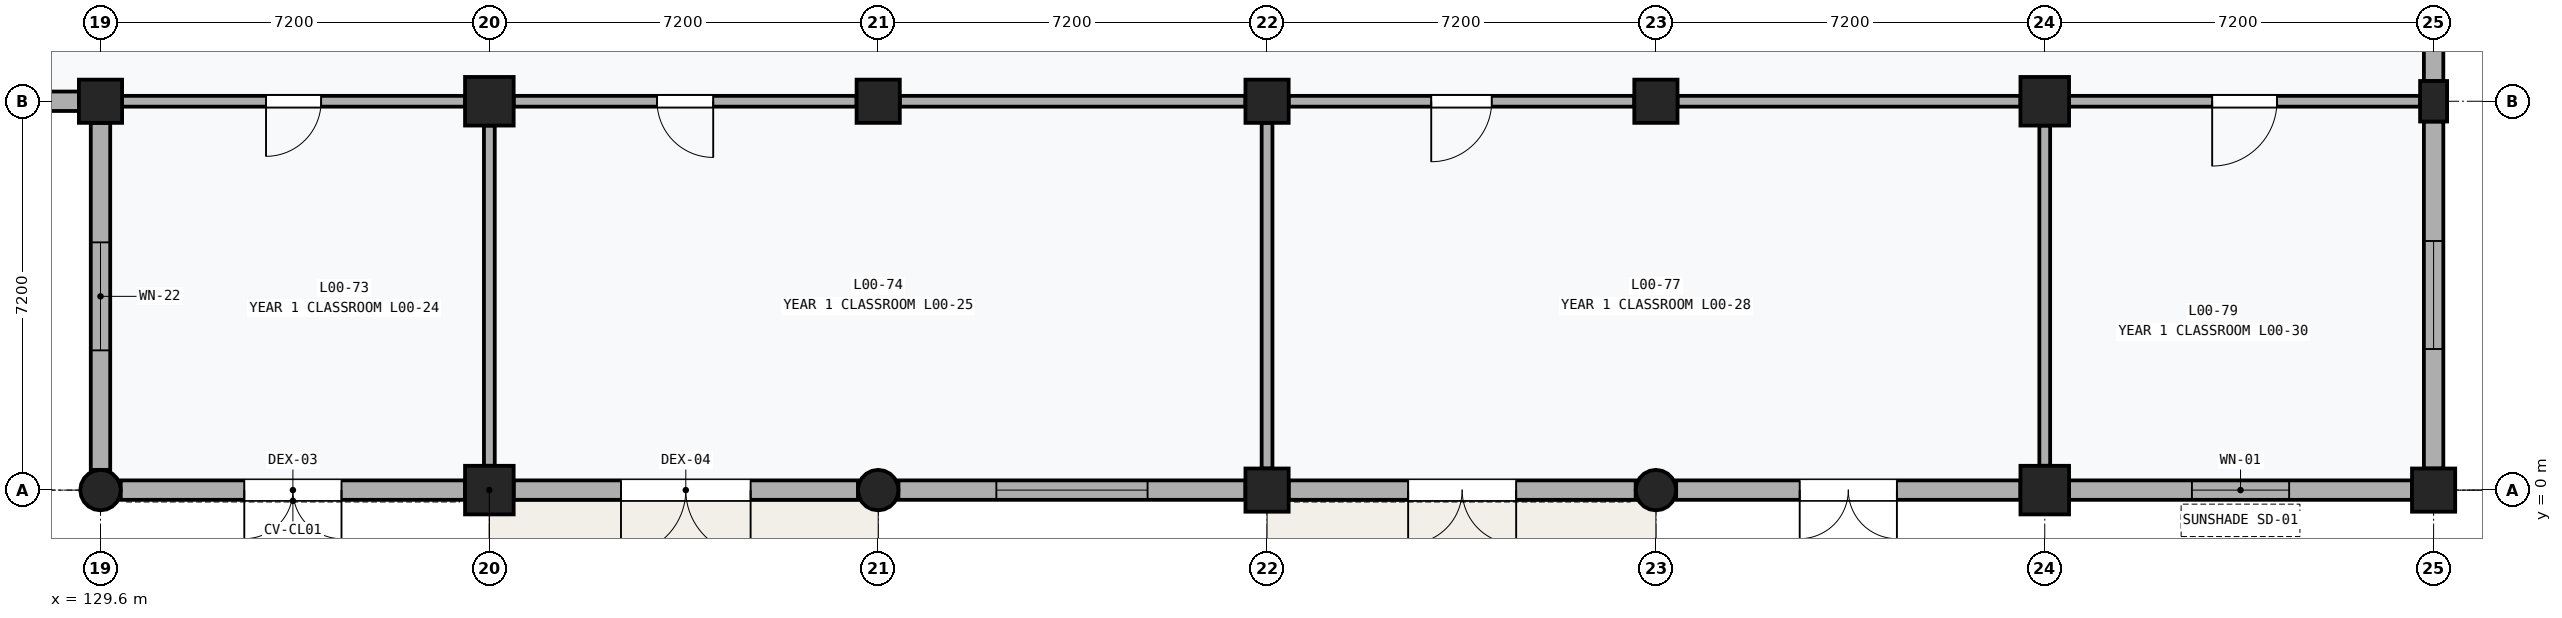
"""IFC4 building model, lengths in metres.
Left out: names, types, materials, properties, quantities, classifications, styles, units other than length and angle.
Written with IfcOpenShell. Run it as: python <this file> out.ifc"""

import sys

from ifc_helpers import new_model, si_unit, direction, frame, frame_2d, origin, origin_2d, place, context, subcontext, project, spatial, rectangle, circle, extrude, element, fill, save


model = new_model("IFC4")
c1 = context("Model", 3, precision=1e-05, world=origin(), true_north=direction((0.0, 1.0)))
c2 = subcontext(c1, "Body", "Model", "MODEL_VIEW")
j1 = project(units=[si_unit("LENGTHUNIT", "METRE"), si_unit("PLANEANGLEUNIT", "RADIAN")], contexts=[c1])
p1 = place(None, origin())
s1 = spatial("IfcSite", under=j1, at=p1, CompositionType="ELEMENT")
p2 = place(p1, origin())
s2 = spatial("IfcBuilding", under=s1, at=p2, CompositionType="ELEMENT")
p3 = place(p2, origin())
s3 = spatial("IfcBuildingStorey", under=s2, at=p3, CompositionType="ELEMENT", Elevation=0.0)
p4 = place(p3, frame((129.6, 0.0, 0.0), z_axis=(0.0, 0.0, 1.0), x_axis=(1.0, 0.0, 0.0)))
e1 = element("IfcColumn", 1, at=p4, inside=s3, PredefinedType="COLUMN", context=c2, shape_type="SweptSolid", body=[
    extrude(circle(Radius=0.375, at=origin_2d()), origin(), (0.0, 0.0, 1.0), 4.8),
])
p5 = place(p3, frame((129.6, 7.2, 0.0), z_axis=(0.0, 0.0, 1.0), x_axis=(1.0, 0.0, 0.0)))
e2 = element("IfcColumn", 2, at=p5, inside=s3, PredefinedType="COLUMN", context=c2, shape_type="SweptSolid", body=[
    extrude(rectangle(XDim=0.8, YDim=0.8, at=origin_2d()), origin(), (0.0, 0.0, 1.0), 4.8),
])
for number, where, z_axis, x_axis in (
    (3, (136.8, 0.0, 0.0), (0.0, 0.0, 1.0), (1.0, 0.0, 0.0)),
    (4, (136.8, 7.2, 0.0), (0.0, 0.0, 1.0), (1.0, 0.0, 0.0)),
):
    element("IfcColumn", number, at=place(p3, frame(where, z_axis=z_axis, x_axis=x_axis)), inside=s3, PredefinedType="COLUMN", context=c2, shape_type="SweptSolid", body=[
        extrude(rectangle(XDim=0.9, YDim=0.9, at=origin_2d()), origin(), (0.0, 0.0, 1.0), 4.8),
    ])
p6 = place(p3, frame((144.0, 0.0, 0.0), z_axis=(0.0, 0.0, 1.0), x_axis=(1.0, 0.0, 0.0)))
e5 = element("IfcColumn", 5, at=p6, inside=s3, PredefinedType="COLUMN", context=c2, shape_type="SweptSolid", body=[
    extrude(circle(Radius=0.375, at=origin_2d()), origin(), (0.0, 0.0, 1.0), 4.8),
])
for number, where, z_axis, x_axis in (
    (6, (144.0, 7.2, 0.0), (0.0, 0.0, 1.0), (1.0, 0.0, 0.0)),
    (7, (151.2, 0.0, 0.0), (0.0, 0.0, 1.0), (1.0, 0.0, 0.0)),
    (8, (151.2, 7.2, 0.0), (0.0, 0.0, 1.0), (1.0, 0.0, 0.0)),
):
    element("IfcColumn", number, at=place(p3, frame(where, z_axis=z_axis, x_axis=x_axis)), inside=s3, PredefinedType="COLUMN", context=c2, shape_type="SweptSolid", body=[
        extrude(rectangle(XDim=0.8, YDim=0.8, at=origin_2d()), origin(), (0.0, 0.0, 1.0), 4.8),
    ])
p7 = place(p3, frame((158.4, 0.0, 0.0), z_axis=(0.0, 0.0, 1.0), x_axis=(1.0, 0.0, 0.0)))
e9 = element("IfcColumn", 9, at=p7, inside=s3, PredefinedType="COLUMN", context=c2, shape_type="SweptSolid", body=[
    extrude(circle(Radius=0.375, at=origin_2d()), origin(), (0.0, 0.0, 1.0), 4.8),
])
p8 = place(p3, frame((158.4, 7.2, 0.0), z_axis=(0.0, 0.0, 1.0), x_axis=(1.0, 0.0, 0.0)))
e10 = element("IfcColumn", 10, at=p8, inside=s3, PredefinedType="COLUMN", context=c2, shape_type="SweptSolid", body=[
    extrude(rectangle(XDim=0.8, YDim=0.8, at=origin_2d()), origin(), (0.0, 0.0, 1.0), 4.8),
])
for number, where, z_axis, x_axis in (
    (11, (165.6, 0.0, 0.0), (0.0, 0.0, 1.0), (1.0, 0.0, 0.0)),
    (12, (165.6, 7.2, 0.0), (0.0, 0.0, 1.0), (1.0, 0.0, 0.0)),
):
    element("IfcColumn", number, at=place(p3, frame(where, z_axis=z_axis, x_axis=x_axis)), inside=s3, PredefinedType="COLUMN", context=c2, shape_type="SweptSolid", body=[
        extrude(rectangle(XDim=0.9, YDim=0.9, at=origin_2d()), origin(), (0.0, 0.0, 1.0), 4.8),
    ])
p9 = place(p3, frame((172.8, 0.0, 0.0), z_axis=(0.0, 0.0, 1.0), x_axis=(1.0, 0.0, 0.0)))
e13 = element("IfcColumn", 13, at=p9, inside=s3, PredefinedType="COLUMN", context=c2, shape_type="SweptSolid", body=[
    extrude(rectangle(XDim=0.8, YDim=0.8, at=origin_2d()), origin(), (0.0, 0.0, 1.0), 4.8),
])
p10 = place(p3, frame((172.8, 7.2, 0.0), z_axis=(0.0, 0.0, 1.0), x_axis=(1.0, 0.0, 0.0)))
e14 = element("IfcColumn", 14, at=p10, inside=s3, PredefinedType="PILASTER", context=c2, shape_type="SweptSolid", body=[
    extrude(rectangle(XDim=0.5, YDim=0.75, at=origin_2d()), origin(), (0.0, 0.0, 1.0), 4.8),
])
p11 = place(p3, frame((122.8, 7.2, 0.0), z_axis=(0.0, 0.0, 1.0), x_axis=(1.0, 0.0, 0.0)))
e15 = element("IfcWall", 15, at=p11, inside=s3, PredefinedType="SOLIDWALL", context=c2, shape_type="SweptSolid", body=[
    extrude(rectangle(XDim=6.4, YDim=0.36, at=frame_2d((3.2, 0.0))), origin(), (0.0, 0.0, 1.0), 3.89),
])
p12 = place(p11, frame((2.2, 0.0, 0.0)))
e16 = element("IfcOpeningElement", 16, at=p12, cuts=e15, PredefinedType="OPENING", context=c2, shape_type="SweptSolid", body=[
    extrude(rectangle(XDim=2.0, YDim=2.4, at=frame_2d((1.0, 1.2))), frame((0.0, 0.192, 0.0), z_axis=(0.0, -1.0, 0.0), x_axis=(1.0, 0.0, 0.0)), (0.0, 0.0, 1.0), 0.384),
])
p13 = place(p3, frame((129.975, 0.0, 0.0), z_axis=(0.0, 0.0, 1.0), x_axis=(1.0, 0.0, 0.0)))
e17 = element("IfcWall", 17, at=p13, inside=s3, PredefinedType="SOLIDWALL", context=c2, shape_type="SweptSolid", body=[
    extrude(rectangle(XDim=6.375, YDim=0.36, at=frame_2d((3.188, 0.0))), origin(), (0.0, 0.0, 1.0), 3.89),
])
p14 = place(p13, frame((2.288, 0.0, 0.0)))
e18 = element("IfcOpeningElement", 18, at=p14, cuts=e17, PredefinedType="OPENING", context=c2, shape_type="SweptSolid", body=[
    extrude(rectangle(XDim=1.8, YDim=2.35, at=frame_2d((0.9, 1.175))), frame((0.0, 0.192, 0.0), z_axis=(0.0, -1.0, 0.0), x_axis=(1.0, 0.0, 0.0)), (0.0, 0.0, 1.0), 0.384),
])
p15 = place(p3, frame((129.6, 0.375, 0.0), z_axis=(0.0, 0.0, 1.0), x_axis=(0.0, 1.0, 0.0)))
e19 = element("IfcWall", 19, at=p15, inside=s3, PredefinedType="SOLIDWALL", context=c2, shape_type="SweptSolid", body=[
    extrude(rectangle(XDim=6.425, YDim=0.36, at=frame_2d((3.212, 0.0))), origin(), (0.0, 0.0, 1.0), 3.89),
])
p16 = place(p15, frame((2.212, 0.0, 0.7)))
e20 = element("IfcOpeningElement", 20, at=p16, cuts=e19, PredefinedType="OPENING", context=c2, shape_type="SweptSolid", body=[
    extrude(rectangle(XDim=2.0, YDim=2.2, at=frame_2d((1.0, 1.1))), frame((0.0, 0.192, 0.0), z_axis=(0.0, -1.0, 0.0), x_axis=(1.0, 0.0, 0.0)), (0.0, 0.0, 1.0), 0.384),
])
p17 = place(p3, frame((137.25, 0.0, 0.0), z_axis=(0.0, 0.0, 1.0), x_axis=(1.0, 0.0, 0.0)))
e21 = element("IfcWall", 21, at=p17, inside=s3, PredefinedType="SOLIDWALL", context=c2, shape_type="SweptSolid", body=[
    extrude(rectangle(XDim=6.375, YDim=0.36, at=frame_2d((3.188, 0.0))), origin(), (0.0, 0.0, 1.0), 3.89),
])
p18 = place(p17, frame((1.988, 0.0, 0.0)))
e22 = element("IfcOpeningElement", 22, at=p18, cuts=e21, PredefinedType="OPENING", context=c2, shape_type="SweptSolid", body=[
    extrude(rectangle(XDim=2.4, YDim=2.45, at=frame_2d((1.2, 1.225))), frame((0.0, 0.192, 0.0), z_axis=(0.0, -1.0, 0.0), x_axis=(1.0, 0.0, 0.0)), (0.0, 0.0, 1.0), 0.384),
])
p19 = place(p3, frame((144.375, 0.0, 0.0), z_axis=(0.0, 0.0, 1.0), x_axis=(1.0, 0.0, 0.0)))
e23 = element("IfcWall", 23, at=p19, inside=s3, PredefinedType="SOLIDWALL", context=c2, shape_type="SweptSolid", body=[
    extrude(rectangle(XDim=6.425, YDim=0.36, at=frame_2d((3.212, 0.0))), origin(), (0.0, 0.0, 1.0), 3.89),
])
p20 = place(p19, frame((1.812, 0.0, 0.7)))
e24 = element("IfcOpeningElement", 24, at=p20, cuts=e23, PredefinedType="OPENING", context=c2, shape_type="SweptSolid", body=[
    extrude(rectangle(XDim=2.8, YDim=2.2, at=frame_2d((1.4, 1.1))), frame((0.0, 0.192, 0.0), z_axis=(0.0, -1.0, 0.0), x_axis=(1.0, 0.0, 0.0)), (0.0, 0.0, 1.0), 0.384),
])
p21 = place(p3, frame((151.6, 0.0, 0.0), z_axis=(0.0, 0.0, 1.0), x_axis=(1.0, 0.0, 0.0)))
e25 = element("IfcWall", 25, at=p21, inside=s3, PredefinedType="SOLIDWALL", context=c2, shape_type="SweptSolid", body=[
    extrude(rectangle(XDim=6.425, YDim=0.36, at=frame_2d((3.212, 0.0))), origin(), (0.0, 0.0, 1.0), 3.89),
])
p22 = place(p21, frame((2.212, 0.0, 0.0)))
e26 = element("IfcOpeningElement", 26, at=p22, cuts=e25, PredefinedType="OPENING", context=c2, shape_type="SweptSolid", body=[
    extrude(rectangle(XDim=2.0, YDim=2.4, at=frame_2d((1.0, 1.2))), frame((0.0, 0.192, 0.0), z_axis=(0.0, -1.0, 0.0), x_axis=(1.0, 0.0, 0.0)), (0.0, 0.0, 1.0), 0.384),
])
p23 = place(p3, frame((158.775, 0.0, 0.0), z_axis=(0.0, 0.0, 1.0), x_axis=(1.0, 0.0, 0.0)))
e27 = element("IfcWall", 27, at=p23, inside=s3, PredefinedType="SOLIDWALL", context=c2, shape_type="SweptSolid", body=[
    extrude(rectangle(XDim=6.375, YDim=0.36, at=frame_2d((3.188, 0.0))), origin(), (0.0, 0.0, 1.0), 3.89),
])
p24 = place(p23, frame((2.288, 0.0, 0.0)))
e28 = element("IfcOpeningElement", 28, at=p24, cuts=e27, PredefinedType="OPENING", context=c2, shape_type="SweptSolid", body=[
    extrude(rectangle(XDim=1.8, YDim=2.35, at=frame_2d((0.9, 1.175))), frame((0.0, 0.192, 0.0), z_axis=(0.0, -1.0, 0.0), x_axis=(1.0, 0.0, 0.0)), (0.0, 0.0, 1.0), 0.384),
])
p25 = place(p3, frame((166.05, 0.0, 0.0), z_axis=(0.0, 0.0, 1.0), x_axis=(1.0, 0.0, 0.0)))
e29 = element("IfcWall", 29, at=p25, inside=s3, PredefinedType="SOLIDWALL", context=c2, shape_type="SweptSolid", body=[
    extrude(rectangle(XDim=6.35, YDim=0.36, at=frame_2d((3.175, 0.0))), origin(), (0.0, 0.0, 1.0), 3.89),
])
p26 = place(p25, frame((2.275, 0.0, 0.9)))
e30 = element("IfcOpeningElement", 30, at=p26, cuts=e29, PredefinedType="OPENING", context=c2, shape_type="SweptSolid", body=[
    extrude(rectangle(XDim=1.8, YDim=1.8, at=frame_2d((0.9, 0.9))), frame((0.0, 0.192, 0.0), z_axis=(0.0, -1.0, 0.0), x_axis=(1.0, 0.0, 0.0)), (0.0, 0.0, 1.0), 0.384),
])
p27 = place(p3, frame((172.8, 0.4, 0.0), z_axis=(0.0, 0.0, 1.0), x_axis=(0.0, 1.0, 0.0)))
e31 = element("IfcWall", 31, at=p27, inside=s3, PredefinedType="SOLIDWALL", context=c2, shape_type="SweptSolid", body=[
    extrude(rectangle(XDim=6.425, YDim=0.36, at=frame_2d((3.212, 0.0))), origin(), (0.0, 0.0, 1.0), 3.89),
])
p28 = place(p27, frame((2.212, 0.0, 0.9)))
e32 = element("IfcOpeningElement", 32, at=p28, cuts=e31, PredefinedType="OPENING", context=c2, shape_type="SweptSolid", body=[
    extrude(rectangle(XDim=2.0, YDim=1.8, at=frame_2d((1.0, 0.9))), frame((0.0, 0.192, 0.0), z_axis=(0.0, -1.0, 0.0), x_axis=(1.0, 0.0, 0.0)), (0.0, 0.0, 1.0), 0.384),
])
p29 = place(p3, frame((172.8, 7.575, 0.0), z_axis=(0.0, 0.0, 1.0), x_axis=(0.0, 1.0, 0.0)))
e33 = element("IfcWall", 33, at=p29, inside=s3, PredefinedType="SOLIDWALL", context=c2, shape_type="SweptSolid", body=[
    extrude(rectangle(XDim=6.425, YDim=0.36, at=frame_2d((3.212, 0.0))), origin(), (0.0, 0.0, 1.0), 3.89),
])
p30 = place(p29, frame((2.113, 0.0, 0.9)))
e34 = element("IfcOpeningElement", 34, at=p30, cuts=e33, PredefinedType="OPENING", context=c2, shape_type="SweptSolid", body=[
    extrude(rectangle(XDim=2.2, YDim=1.8, at=frame_2d((1.1, 0.9))), frame((0.0, 0.192, 0.0), z_axis=(0.0, -1.0, 0.0), x_axis=(1.0, 0.0, 0.0)), (0.0, 0.0, 1.0), 0.384),
])
p31 = place(p3, frame((130.0, 7.2, 0.0), z_axis=(0.0, 0.0, 1.0), x_axis=(1.0, 0.0, 0.0)))
e35 = element("IfcWall", 35, at=p31, inside=s3, PredefinedType="PARTITIONING", context=c2, shape_type="SweptSolid", body=[
    extrude(rectangle(XDim=6.35, YDim=0.2, at=frame_2d((3.175, 0.0))), origin(), (0.0, 0.0, 1.0), 3.62),
])
p32 = place(p31, frame((2.665, 0.0, 0.0)))
e36 = element("IfcOpeningElement", 36, at=p32, cuts=e35, PredefinedType="OPENING", context=c2, shape_type="SweptSolid", body=[
    extrude(rectangle(XDim=1.02, YDim=2.12, at=frame_2d((0.51, 1.06))), frame((0.0, 0.112, 0.0), z_axis=(0.0, -1.0, 0.0), x_axis=(1.0, 0.0, 0.0)), (0.0, 0.0, 1.0), 0.224),
])
p33 = place(p3, frame((136.8, 0.45, 0.0), z_axis=(0.0, 0.0, 1.0), x_axis=(0.0, 1.0, 0.0)))
e37 = element("IfcWall", 37, at=p33, inside=s3, PredefinedType="PARTITIONING", context=c2, shape_type="SweptSolid", body=[
    extrude(rectangle(XDim=6.3, YDim=0.2, at=frame_2d((3.15, 0.0))), origin(), (0.0, 0.0, 1.0), 3.62),
])
p34 = place(p3, frame((137.25, 7.2, 0.0), z_axis=(0.0, 0.0, 1.0), x_axis=(1.0, 0.0, 0.0)))
e38 = element("IfcWall", 38, at=p34, inside=s3, PredefinedType="PARTITIONING", context=c2, shape_type="SweptSolid", body=[
    extrude(rectangle(XDim=6.35, YDim=0.2, at=frame_2d((3.175, 0.0))), origin(), (0.0, 0.0, 1.0), 3.62),
])
p35 = place(p34, frame((2.655, 0.0, 0.0)))
e39 = element("IfcOpeningElement", 39, at=p35, cuts=e38, PredefinedType="OPENING", context=c2, shape_type="SweptSolid", body=[
    extrude(rectangle(XDim=1.04, YDim=2.14, at=frame_2d((0.52, 1.07))), frame((0.0, 0.112, 0.0), z_axis=(0.0, -1.0, 0.0), x_axis=(1.0, 0.0, 0.0)), (0.0, 0.0, 1.0), 0.224),
])
for number, where, z_axis, x_axis in (
    (40, (144.4, 7.2, 0.0), (0.0, 0.0, 1.0), (1.0, 0.0, 0.0)),
    (41, (151.2, 0.4, 0.0), (0.0, 0.0, 1.0), (0.0, 1.0, 0.0)),
):
    element("IfcWall", number, at=place(p3, frame(where, z_axis=z_axis, x_axis=x_axis)), inside=s3, PredefinedType="PARTITIONING", context=c2, shape_type="SweptSolid", body=[
        extrude(rectangle(XDim=6.4, YDim=0.2, at=frame_2d((3.2, 0.0))), origin(), (0.0, 0.0, 1.0), 3.62),
    ])
p36 = place(p3, frame((151.6, 7.2, 0.0), z_axis=(0.0, 0.0, 1.0), x_axis=(1.0, 0.0, 0.0)))
e42 = element("IfcWall", 42, at=p36, inside=s3, PredefinedType="PARTITIONING", context=c2, shape_type="SweptSolid", body=[
    extrude(rectangle(XDim=6.4, YDim=0.2, at=frame_2d((3.2, 0.0))), origin(), (0.0, 0.0, 1.0), 3.62),
])
p37 = place(p36, frame((2.64, 0.0, 0.0)))
e43 = element("IfcOpeningElement", 43, at=p37, cuts=e42, PredefinedType="OPENING", context=c2, shape_type="SweptSolid", body=[
    extrude(rectangle(XDim=1.12, YDim=2.2, at=frame_2d((0.56, 1.1))), frame((0.0, 0.112, 0.0), z_axis=(0.0, -1.0, 0.0), x_axis=(1.0, 0.0, 0.0)), (0.0, 0.0, 1.0), 0.224),
])
p38 = place(p3, frame((158.8, 7.2, 0.0), z_axis=(0.0, 0.0, 1.0), x_axis=(1.0, 0.0, 0.0)))
e44 = element("IfcWall", 44, at=p38, inside=s3, PredefinedType="PARTITIONING", context=c2, shape_type="SweptSolid", body=[
    extrude(rectangle(XDim=6.35, YDim=0.2, at=frame_2d((3.175, 0.0))), origin(), (0.0, 0.0, 1.0), 3.62),
])
p39 = place(p3, frame((165.6, 0.45, 0.0), z_axis=(0.0, 0.0, 1.0), x_axis=(0.0, 1.0, 0.0)))
e45 = element("IfcWall", 45, at=p39, inside=s3, PredefinedType="PARTITIONING", context=c2, shape_type="SweptSolid", body=[
    extrude(rectangle(XDim=6.3, YDim=0.2, at=frame_2d((3.15, 0.0))), origin(), (0.0, 0.0, 1.0), 3.62),
])
p40 = place(p3, frame((166.05, 7.2, 0.0), z_axis=(0.0, 0.0, 1.0), x_axis=(1.0, 0.0, 0.0)))
e46 = element("IfcWall", 46, at=p40, inside=s3, PredefinedType="PARTITIONING", context=c2, shape_type="SweptSolid", body=[
    extrude(rectangle(XDim=6.5, YDim=0.2, at=frame_2d((3.25, 0.0))), origin(), (0.0, 0.0, 1.0), 3.62),
])
p41 = place(p40, frame((2.65, 0.0, 0.0)))
e47 = element("IfcOpeningElement", 47, at=p41, cuts=e46, PredefinedType="OPENING", context=c2, shape_type="SweptSolid", body=[
    extrude(rectangle(XDim=1.2, YDim=2.24, at=frame_2d((0.6, 1.12))), frame((0.0, 0.112, 0.0), z_axis=(0.0, -1.0, 0.0), x_axis=(1.0, 0.0, 0.0)), (0.0, 0.0, 1.0), 0.224),
])
p42 = place(p14, frame((1.8, 0.0, 0.0), z_axis=(0.0, 0.0, 1.0), x_axis=(-1.0, 0.0, 0.0)))
e48 = element("IfcDoor", 48, at=p42, inside=s3, OperationType="DOUBLE_DOOR_SINGLE_SWING", PredefinedType="DOOR", context=c2, shape_type="SweptSolid", body=[
    extrude(rectangle(XDim=1.8, YDim=2.35, at=frame_2d((0.9, 1.175))), frame((0.0, 0.025, 0.0), z_axis=(0.0, -1.0, 0.0), x_axis=(1.0, 0.0, 0.0)), (0.0, 0.0, 1.0), 0.05),
])
fill(e18, e48)
p43 = place(p16, origin())
e49 = element("IfcWindow", 49, at=p43, inside=s3, PartitioningType="SINGLE_PANEL", PredefinedType="WINDOW", context=c2, shape_type="SweptSolid", body=[
    extrude(rectangle(XDim=2.0, YDim=2.2, at=frame_2d((1.0, 1.1))), frame((0.0, 0.03, 0.0), z_axis=(0.0, -1.0, 0.0), x_axis=(1.0, 0.0, 0.0)), (0.0, 0.0, 1.0), 0.06),
])
fill(e20, e49)
p44 = place(p18, frame((2.4, 0.0, 0.0), z_axis=(0.0, 0.0, 1.0), x_axis=(-1.0, 0.0, 0.0)))
e50 = element("IfcDoor", 50, at=p44, inside=s3, OperationType="DOUBLE_DOOR_SINGLE_SWING", PredefinedType="DOOR", context=c2, shape_type="SweptSolid", body=[
    extrude(rectangle(XDim=2.4, YDim=2.45, at=frame_2d((1.2, 1.225))), frame((0.0, 0.025, 0.0), z_axis=(0.0, -1.0, 0.0), x_axis=(1.0, 0.0, 0.0)), (0.0, 0.0, 1.0), 0.05),
])
fill(e22, e50)
p45 = place(p20, origin())
e51 = element("IfcWindow", 51, at=p45, inside=s3, PartitioningType="SINGLE_PANEL", PredefinedType="WINDOW", context=c2, shape_type="SweptSolid", body=[
    extrude(rectangle(XDim=2.8, YDim=2.2, at=frame_2d((1.4, 1.1))), frame((0.0, 0.03, 0.0), z_axis=(0.0, -1.0, 0.0), x_axis=(1.0, 0.0, 0.0)), (0.0, 0.0, 1.0), 0.06),
])
fill(e24, e51)
p46 = place(p22, frame((2.0, 0.0, 0.0), z_axis=(0.0, 0.0, 1.0), x_axis=(-1.0, 0.0, 0.0)))
e52 = element("IfcDoor", 52, at=p46, inside=s3, OperationType="DOUBLE_DOOR_SINGLE_SWING", PredefinedType="DOOR", context=c2, shape_type="SweptSolid", body=[
    extrude(rectangle(XDim=2.0, YDim=2.4, at=frame_2d((1.0, 1.2))), frame((0.0, 0.025, 0.0), z_axis=(0.0, -1.0, 0.0), x_axis=(1.0, 0.0, 0.0)), (0.0, 0.0, 1.0), 0.05),
])
fill(e26, e52)
p47 = place(p24, frame((1.8, 0.0, 0.0), z_axis=(0.0, 0.0, 1.0), x_axis=(-1.0, 0.0, 0.0)))
e53 = element("IfcDoor", 53, at=p47, inside=s3, OperationType="DOUBLE_DOOR_SINGLE_SWING", PredefinedType="DOOR", context=c2, shape_type="SweptSolid", body=[
    extrude(rectangle(XDim=1.8, YDim=2.35, at=frame_2d((0.9, 1.175))), frame((0.0, 0.025, 0.0), z_axis=(0.0, -1.0, 0.0), x_axis=(1.0, 0.0, 0.0)), (0.0, 0.0, 1.0), 0.05),
])
fill(e28, e53)
p48 = place(p26, origin())
e54 = element("IfcWindow", 54, at=p48, inside=s3, PartitioningType="SINGLE_PANEL", PredefinedType="WINDOW", context=c2, shape_type="SweptSolid", body=[
    extrude(rectangle(XDim=1.8, YDim=1.8, at=frame_2d((0.9, 0.9))), frame((0.0, 0.03, 0.0), z_axis=(0.0, -1.0, 0.0), x_axis=(1.0, 0.0, 0.0)), (0.0, 0.0, 1.0), 0.06),
])
fill(e30, e54)
p49 = place(p28, origin())
e55 = element("IfcWindow", 55, at=p49, inside=s3, PartitioningType="SINGLE_PANEL", PredefinedType="WINDOW", context=c2, shape_type="SweptSolid", body=[
    extrude(rectangle(XDim=2.0, YDim=1.8, at=frame_2d((1.0, 0.9))), frame((0.0, 0.03, 0.0), z_axis=(0.0, -1.0, 0.0), x_axis=(1.0, 0.0, 0.0)), (0.0, 0.0, 1.0), 0.06),
])
fill(e32, e55)
p50 = place(p32, frame((1.02, 0.0, 0.0), z_axis=(0.0, 0.0, 1.0), x_axis=(-1.0, 0.0, 0.0)))
e56 = element("IfcDoor", 56, at=p50, inside=s3, OperationType="SINGLE_SWING_RIGHT", PredefinedType="DOOR", context=c2, shape_type="SweptSolid", body=[
    extrude(rectangle(XDim=1.02, YDim=2.12, at=frame_2d((0.51, 1.06))), frame((0.0, 0.025, 0.0), z_axis=(0.0, -1.0, 0.0), x_axis=(1.0, 0.0, 0.0)), (0.0, 0.0, 1.0), 0.05),
])
fill(e36, e56)
p51 = place(p35, frame((1.04, 0.0, 0.0), z_axis=(0.0, 0.0, 1.0), x_axis=(-1.0, 0.0, 0.0)))
e57 = element("IfcDoor", 57, at=p51, inside=s3, OperationType="SINGLE_SWING_LEFT", PredefinedType="DOOR", context=c2, shape_type="SweptSolid", body=[
    extrude(rectangle(XDim=1.04, YDim=2.14, at=frame_2d((0.52, 1.07))), frame((0.0, 0.025, 0.0), z_axis=(0.0, -1.0, 0.0), x_axis=(1.0, 0.0, 0.0)), (0.0, 0.0, 1.0), 0.05),
])
fill(e39, e57)
p52 = place(p37, frame((1.12, 0.0, 0.0), z_axis=(0.0, 0.0, 1.0), x_axis=(-1.0, 0.0, 0.0)))
e58 = element("IfcDoor", 58, at=p52, inside=s3, OperationType="SINGLE_SWING_RIGHT", PredefinedType="DOOR", context=c2, shape_type="SweptSolid", body=[
    extrude(rectangle(XDim=1.12, YDim=2.2, at=frame_2d((0.56, 1.1))), frame((0.0, 0.025, 0.0), z_axis=(0.0, -1.0, 0.0), x_axis=(1.0, 0.0, 0.0)), (0.0, 0.0, 1.0), 0.05),
])
fill(e43, e58)
p53 = place(p41, frame((1.2, 0.0, 0.0), z_axis=(0.0, 0.0, 1.0), x_axis=(-1.0, 0.0, 0.0)))
e59 = element("IfcDoor", 59, at=p53, inside=s3, OperationType="SINGLE_SWING_RIGHT", PredefinedType="DOOR", context=c2, shape_type="SweptSolid", body=[
    extrude(rectangle(XDim=1.2, YDim=2.24, at=frame_2d((0.6, 1.12))), frame((0.0, 0.025, 0.0), z_axis=(0.0, -1.0, 0.0), x_axis=(1.0, 0.0, 0.0)), (0.0, 0.0, 1.0), 0.05),
])
fill(e47, e59)
save(model, sys.argv[1])
